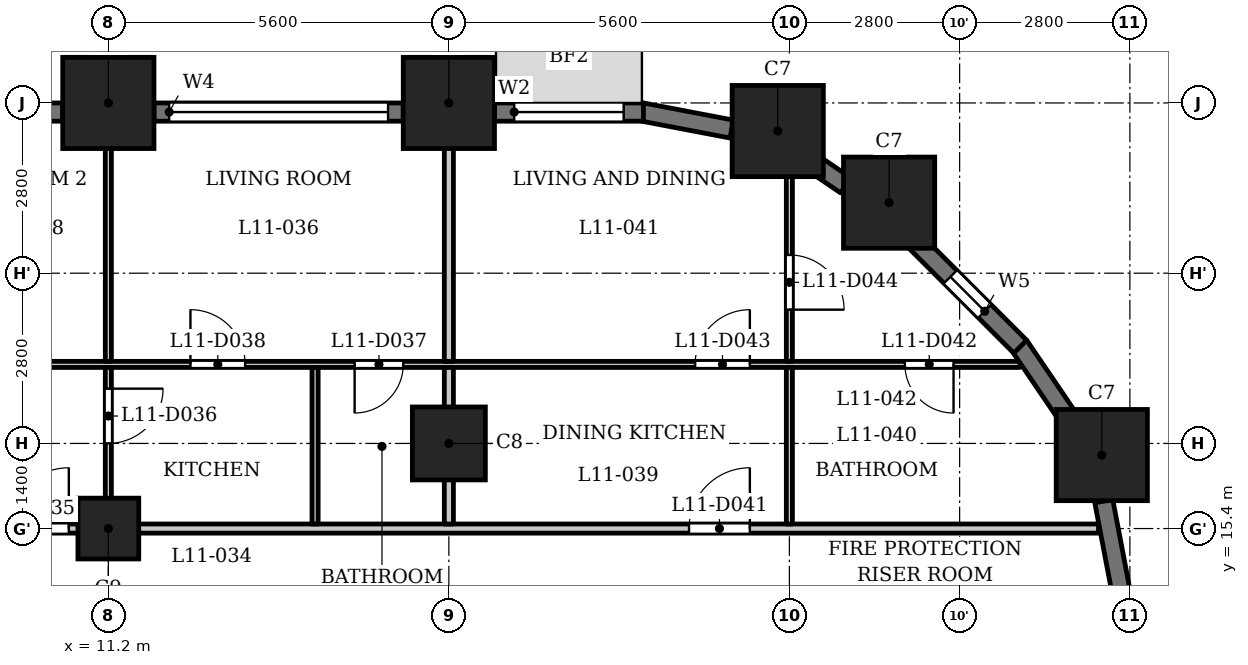
"""IFC4 building model, lengths in metres.
Left out: names, types, materials, properties, quantities, classifications, styles, units other than length and angle.
Written with IfcOpenShell. Run it as: python <this file> out.ifc"""

import sys

from ifc_helpers import new_model, si_unit, direction, frame, frame_2d, origin, origin_2d, place, context, subcontext, project, spatial, rectangle, extrude, element, fill, save


model = new_model("IFC4")
c1 = context("Model", 3, precision=1e-05, world=origin(), true_north=direction((0.0, 1.0)))
c2 = subcontext(c1, "Body", "Model", "MODEL_VIEW")
j1 = project(units=[si_unit("LENGTHUNIT", "METRE"), si_unit("PLANEANGLEUNIT", "RADIAN")], contexts=[c1])
p1 = place(None, origin())
s1 = spatial("IfcSite", under=j1, at=p1, CompositionType="ELEMENT")
p2 = place(p1, origin())
s2 = spatial("IfcBuilding", under=s1, at=p2, CompositionType="ELEMENT")
p3 = place(p2, frame((0.0, 0.0, 48.0)))
s3 = spatial("IfcBuildingStorey", under=s2, at=p3, CompositionType="ELEMENT", Elevation=48.0)
for number, where, z_axis, x_axis in (
    (1, (27.538, 16.609, 0.0), (0.0, 0.0, 1.0), (1.0, 0.0, 0.0)),
    (2, (24.04, 20.76, 0.0), (0.0, 0.0, 1.0), (1.0, 0.0, 0.0)),
    (3, (22.209, 21.938, 0.0), (0.0, 0.0, 1.0), (1.0, 0.0, 0.0)),
    (4, (16.8, 22.4, 0.0), (0.0, 0.0, 1.0), (1.0, 0.0, 0.0)),
    (5, (11.2, 22.4, 0.0), (0.0, 0.0, 1.0), (1.0, 0.0, 0.0)),
):
    element("IfcColumn", number, at=place(p3, frame(where, z_axis=z_axis, x_axis=x_axis)), inside=s3, PredefinedType="COLUMN", context=c2, shape_type="SweptSolid", body=[
        extrude(rectangle(XDim=1.5, YDim=1.5, at=origin_2d()), origin(), (0.0, 0.0, 1.0), 3.5),
    ])
p4 = place(p3, frame((16.8, 16.8, 0.0), z_axis=(0.0, 0.0, 1.0), x_axis=(1.0, 0.0, 0.0)))
e6 = element("IfcColumn", 6, at=p4, inside=s3, PredefinedType="COLUMN", context=c2, shape_type="SweptSolid", body=[
    extrude(rectangle(XDim=1.2, YDim=1.2, at=origin_2d()), origin(), (0.0, 0.0, 1.0), 3.5),
])
p5 = place(p3, frame((11.2, 15.4, 0.0), z_axis=(0.0, 0.0, 1.0), x_axis=(1.0, 0.0, 0.0)))
e7 = element("IfcColumn", 7, at=p5, inside=s3, PredefinedType="COLUMN", context=c2, shape_type="SweptSolid", body=[
    extrude(rectangle(XDim=1.0, YDim=1.0, at=origin_2d()), origin(), (0.0, 0.0, 1.0), 3.5),
])
for number, where, z_axis, x_axis in (
    (8, (27.853, 14.372, 0.0), (0.0, 0.0, 1.0), (-0.187, 0.982, 0.0)),
    (9, (27.025, 17.167, 0.0), (0.0, 0.0, 1.0), (-0.562, 0.827, 0.0)),
):
    element("IfcWall", number, at=place(p3, frame(where, z_axis=z_axis, x_axis=x_axis)), inside=s3, PredefinedType="SOLIDWALL", context=c2, shape_type="SweptSolid", body=[
        extrude(rectangle(XDim=1.506, YDim=0.3, at=frame_2d((0.753, 0.0))), origin(), (0.0, 0.0, 1.0), 2.35),
    ])
p6 = place(p3, frame((26.197, 18.391, 0.0), z_axis=(0.0, 0.0, 1.0), x_axis=(-0.707106781187, 0.707106781187, 0.0)))
e10 = element("IfcWall", 10, at=p6, inside=s3, PredefinedType="SOLIDWALL", context=c2, shape_type="SweptSolid", body=[
    extrude(rectangle(XDim=2.45, YDim=0.3, at=frame_2d((1.225, 0.0))), origin(), (0.0, 0.0, 1.0), 2.35),
])
p7 = place(p6, frame((0.825, 0.0, 0.6)))
e11 = element("IfcOpeningElement", 11, at=p7, cuts=e10, PredefinedType="OPENING", context=c2, shape_type="SweptSolid", body=[
    extrude(rectangle(XDim=0.8, YDim=1.55, at=frame_2d((0.4, 0.775))), frame((0.0, 0.16, 0.0), z_axis=(0.0, -1.0, 0.0), x_axis=(1.0, 0.0, 0.0)), (0.0, 0.0, 1.0), 0.32),
])
p8 = place(p3, frame((23.327, 21.045, 0.0), z_axis=(0.0, 0.0, 1.0), x_axis=(-0.827080706709, 0.562083182981, 0.0)))
e12 = element("IfcWall", 12, at=p8, inside=s3, PredefinedType="SOLIDWALL", context=c2, shape_type="SweptSolid", body=[
    extrude(rectangle(XDim=0.677, YDim=0.3, at=frame_2d((0.339, 0.0))), origin(), (0.0, 0.0, 1.0), 3.2),
])
p9 = place(p3, frame((21.451, 21.97, 0.0), z_axis=(0.0, 0.0, 1.0), x_axis=(-0.982287454367, 0.187380247071, 0.0)))
e13 = element("IfcWall", 13, at=p9, inside=s3, PredefinedType="SOLIDWALL", context=c2, shape_type="SweptSolid", body=[
    extrude(rectangle(XDim=1.506, YDim=0.3, at=frame_2d((0.753, 0.0))), origin(), (0.0, 0.0, 1.0), 2.35),
])
p10 = place(p3, frame((20.0, 22.25, 0.0), z_axis=(0.0, 0.0, 1.0), x_axis=(-1.0, 0.0, 0.0)))
e14 = element("IfcWall", 14, at=p10, inside=s3, PredefinedType="SOLIDWALL", context=c2, shape_type="SweptSolid", body=[
    extrude(rectangle(XDim=2.45, YDim=0.3, at=frame_2d((1.225, 0.0))), origin(), (0.0, 0.0, 1.0), 2.35),
])
p11 = place(p10, frame((0.325, 0.0, 0.9)))
e15 = element("IfcOpeningElement", 15, at=p11, cuts=e14, PredefinedType="OPENING", context=c2, shape_type="SweptSolid", body=[
    extrude(rectangle(XDim=1.8, YDim=1.25, at=frame_2d((0.9, 0.625))), frame((0.0, 0.16, 0.0), z_axis=(0.0, -1.0, 0.0), x_axis=(1.0, 0.0, 0.0)), (0.0, 0.0, 1.0), 0.32),
])
p12 = place(p3, frame((16.05, 22.25, 0.0), z_axis=(0.0, 0.0, 1.0), x_axis=(-1.0, 0.0, 0.0)))
e16 = element("IfcWall", 16, at=p12, inside=s3, PredefinedType="SOLIDWALL", context=c2, shape_type="SweptSolid", body=[
    extrude(rectangle(XDim=4.1, YDim=0.3, at=frame_2d((2.05, 0.0))), origin(), (0.0, 0.0, 1.0), 2.35),
])
p13 = place(p12, frame((0.25, 0.0, 1.2)))
e17 = element("IfcOpeningElement", 17, at=p13, cuts=e16, PredefinedType="OPENING", context=c2, shape_type="SweptSolid", body=[
    extrude(rectangle(XDim=3.6, YDim=0.95, at=frame_2d((1.8, 0.475))), frame((0.0, 0.16, 0.0), z_axis=(0.0, -1.0, 0.0), x_axis=(1.0, 0.0, 0.0)), (0.0, 0.0, 1.0), 0.32),
])
p14 = place(p3, frame((10.45, 22.25, 0.0), z_axis=(0.0, 0.0, 1.0), x_axis=(-1.0, 0.0, 0.0)))
e18 = element("IfcWall", 18, at=p14, inside=s3, PredefinedType="SOLIDWALL", context=c2, shape_type="SweptSolid", body=[
    extrude(rectangle(XDim=4.1, YDim=0.3, at=frame_2d((2.05, 0.0))), origin(), (0.0, 0.0, 1.0), 2.35),
])
p15 = place(p14, frame((0.387, 0.0, 0.6)))
e19 = element("IfcOpeningElement", 19, at=p15, cuts=e18, PredefinedType="OPENING", context=c2, shape_type="SweptSolid", body=[
    extrude(rectangle(XDim=1.2, YDim=1.55, at=frame_2d((0.6, 0.775))), frame((0.0, 0.16, 0.0), z_axis=(0.0, -1.0, 0.0), x_axis=(1.0, 0.0, 0.0)), (0.0, 0.0, 1.0), 0.32),
])
p16 = place(p14, frame((2.512, 0.0, 0.6)))
e20 = element("IfcOpeningElement", 20, at=p16, cuts=e18, PredefinedType="OPENING", context=c2, shape_type="SweptSolid", body=[
    extrude(rectangle(XDim=1.2, YDim=1.55, at=frame_2d((0.6, 0.775))), frame((0.0, 0.16, 0.0), z_axis=(0.0, -1.0, 0.0), x_axis=(1.0, 0.0, 0.0)), (0.0, 0.0, 1.0), 0.32),
])
p17 = place(p3, frame((-27.484, 15.4, 0.0), z_axis=(0.0, 0.0, 1.0), x_axis=(1.0, 0.0, 0.0)))
e21 = element("IfcWall", 21, at=p17, inside=s3, PredefinedType="PARTITIONING", context=c2, shape_type="SweptSolid", body=[
    extrude(rectangle(XDim=54.968, YDim=0.15, at=frame_2d((27.484, 0.0))), origin(), (0.0, 0.0, 1.0), 3.2),
])
p18 = place(p17, frame((8.784, 0.0, 0.0)))
e22 = element("IfcOpeningElement", 22, at=p18, cuts=e21, PredefinedType="OPENING", context=c2, shape_type="SweptSolid", body=[
    extrude(rectangle(XDim=1.0, YDim=2.1, at=frame_2d((0.5, 1.05))), frame((0.0, 0.085, 0.0), z_axis=(0.0, -1.0, 0.0), x_axis=(1.0, 0.0, 0.0)), (0.0, 0.0, 1.0), 0.17),
])
p19 = place(p17, frame((14.634, 0.0, 0.0)))
e23 = element("IfcOpeningElement", 23, at=p19, cuts=e21, PredefinedType="OPENING", context=c2, shape_type="SweptSolid", body=[
    extrude(rectangle(XDim=1.0, YDim=2.1, at=frame_2d((0.5, 1.05))), frame((0.0, 0.085, 0.0), z_axis=(0.0, -1.0, 0.0), x_axis=(1.0, 0.0, 0.0)), (0.0, 0.0, 1.0), 0.17),
])
p20 = place(p17, frame((25.834, 0.0, 0.0)))
e24 = element("IfcOpeningElement", 24, at=p20, cuts=e21, PredefinedType="OPENING", context=c2, shape_type="SweptSolid", body=[
    extrude(rectangle(XDim=1.0, YDim=2.1, at=frame_2d((0.5, 1.05))), frame((0.0, 0.085, 0.0), z_axis=(0.0, -1.0, 0.0), x_axis=(1.0, 0.0, 0.0)), (0.0, 0.0, 1.0), 0.17),
])
p21 = place(p17, frame((30.184, 0.0, 0.0)))
e25 = element("IfcOpeningElement", 25, at=p21, cuts=e21, PredefinedType="OPENING", context=c2, shape_type="SweptSolid", body=[
    extrude(rectangle(XDim=1.0, YDim=2.1, at=frame_2d((0.5, 1.05))), frame((0.0, 0.085, 0.0), z_axis=(0.0, -1.0, 0.0), x_axis=(1.0, 0.0, 0.0)), (0.0, 0.0, 1.0), 0.17),
])
p22 = place(p17, frame((37.034, 0.0, 0.0)))
e26 = element("IfcOpeningElement", 26, at=p22, cuts=e21, PredefinedType="OPENING", context=c2, shape_type="SweptSolid", body=[
    extrude(rectangle(XDim=1.0, YDim=2.1, at=frame_2d((0.5, 1.05))), frame((0.0, 0.085, 0.0), z_axis=(0.0, -1.0, 0.0), x_axis=(1.0, 0.0, 0.0)), (0.0, 0.0, 1.0), 0.17),
])
p23 = place(p17, frame((48.234, 0.0, 0.0)))
e27 = element("IfcOpeningElement", 27, at=p23, cuts=e21, PredefinedType="OPENING", context=c2, shape_type="SweptSolid", body=[
    extrude(rectangle(XDim=1.0, YDim=2.1, at=frame_2d((0.5, 1.05))), frame((0.0, 0.085, 0.0), z_axis=(0.0, -1.0, 0.0), x_axis=(1.0, 0.0, 0.0)), (0.0, 0.0, 1.0), 0.17),
])
p24 = place(p3, frame((-26.44, 18.1, 0.0), z_axis=(0.0, 0.0, 1.0), x_axis=(1.0, 0.0, 0.0)))
e28 = element("IfcWall", 28, at=p24, inside=s3, PredefinedType="PARTITIONING", context=c2, shape_type="SweptSolid", body=[
    extrude(rectangle(XDim=52.63, YDim=0.1, at=frame_2d((26.315, 0.0))), origin(), (0.0, 0.0, 1.0), 3.2),
])
p25 = place(p24, frame((2.626, 0.0, 0.0)))
e29 = element("IfcOpeningElement", 29, at=p25, cuts=e28, PredefinedType="OPENING", context=c2, shape_type="SweptSolid", body=[
    extrude(rectangle(XDim=0.8, YDim=2.1, at=frame_2d((0.4, 1.05))), frame((0.0, 0.06, 0.0), z_axis=(0.0, -1.0, 0.0), x_axis=(1.0, 0.0, 0.0)), (0.0, 0.0, 1.0), 0.12),
])
p26 = place(p24, frame((7.84, 0.0, 0.0)))
e30 = element("IfcOpeningElement", 30, at=p26, cuts=e28, PredefinedType="OPENING", context=c2, shape_type="SweptSolid", body=[
    extrude(rectangle(XDim=0.9, YDim=2.1, at=frame_2d((0.45, 1.05))), frame((0.0, 0.06, 0.0), z_axis=(0.0, -1.0, 0.0), x_axis=(1.0, 0.0, 0.0)), (0.0, 0.0, 1.0), 0.12),
])
p27 = place(p24, frame((18.49, 0.0, 0.0)))
e31 = element("IfcOpeningElement", 31, at=p27, cuts=e28, PredefinedType="OPENING", context=c2, shape_type="SweptSolid", body=[
    extrude(rectangle(XDim=0.8, YDim=2.1, at=frame_2d((0.4, 1.05))), frame((0.0, 0.06, 0.0), z_axis=(0.0, -1.0, 0.0), x_axis=(1.0, 0.0, 0.0)), (0.0, 0.0, 1.0), 0.12),
])
p28 = place(p24, frame((16.54, 0.0, 0.0)))
e32 = element("IfcOpeningElement", 32, at=p28, cuts=e28, PredefinedType="OPENING", context=c2, shape_type="SweptSolid", body=[
    extrude(rectangle(XDim=0.9, YDim=2.1, at=frame_2d((0.45, 1.05))), frame((0.0, 0.06, 0.0), z_axis=(0.0, -1.0, 0.0), x_axis=(1.0, 0.0, 0.0)), (0.0, 0.0, 1.0), 0.12),
])
p29 = place(p24, frame((10.89, 0.0, 0.0)))
e33 = element("IfcOpeningElement", 33, at=p29, cuts=e28, PredefinedType="OPENING", context=c2, shape_type="SweptSolid", body=[
    extrude(rectangle(XDim=0.9, YDim=2.1, at=frame_2d((0.45, 1.05))), frame((0.0, 0.06, 0.0), z_axis=(0.0, -1.0, 0.0), x_axis=(1.0, 0.0, 0.0)), (0.0, 0.0, 1.0), 0.12),
])
p30 = place(p24, frame((12.94, 0.0, 0.0)))
e34 = element("IfcOpeningElement", 34, at=p30, cuts=e28, PredefinedType="OPENING", context=c2, shape_type="SweptSolid", body=[
    extrude(rectangle(XDim=0.9, YDim=2.1, at=frame_2d((0.45, 1.05))), frame((0.0, 0.06, 0.0), z_axis=(0.0, -1.0, 0.0), x_axis=(1.0, 0.0, 0.0)), (0.0, 0.0, 1.0), 0.12),
])
p31 = place(p24, frame((21.49, 0.0, 0.0)))
e35 = element("IfcOpeningElement", 35, at=p31, cuts=e28, PredefinedType="OPENING", context=c2, shape_type="SweptSolid", body=[
    extrude(rectangle(XDim=0.8, YDim=2.1, at=frame_2d((0.4, 1.05))), frame((0.0, 0.06, 0.0), z_axis=(0.0, -1.0, 0.0), x_axis=(1.0, 0.0, 0.0)), (0.0, 0.0, 1.0), 0.12),
])
p32 = place(p24, frame((24.89, 0.0, 0.0)))
e36 = element("IfcOpeningElement", 36, at=p32, cuts=e28, PredefinedType="OPENING", context=c2, shape_type="SweptSolid", body=[
    extrude(rectangle(XDim=0.9, YDim=2.1, at=frame_2d((0.45, 1.05))), frame((0.0, 0.06, 0.0), z_axis=(0.0, -1.0, 0.0), x_axis=(1.0, 0.0, 0.0)), (0.0, 0.0, 1.0), 0.12),
])
p33 = place(p24, frame((27.09, 0.0, 0.0)))
e37 = element("IfcOpeningElement", 37, at=p33, cuts=e28, PredefinedType="OPENING", context=c2, shape_type="SweptSolid", body=[
    extrude(rectangle(XDim=0.8, YDim=2.1, at=frame_2d((0.4, 1.05))), frame((0.0, 0.06, 0.0), z_axis=(0.0, -1.0, 0.0), x_axis=(1.0, 0.0, 0.0)), (0.0, 0.0, 1.0), 0.12),
])
p34 = place(p24, frame((28.99, 0.0, 0.0)))
e38 = element("IfcOpeningElement", 38, at=p34, cuts=e28, PredefinedType="OPENING", context=c2, shape_type="SweptSolid", body=[
    extrude(rectangle(XDim=0.9, YDim=2.1, at=frame_2d((0.45, 1.05))), frame((0.0, 0.06, 0.0), z_axis=(0.0, -1.0, 0.0), x_axis=(1.0, 0.0, 0.0)), (0.0, 0.0, 1.0), 0.12),
])
p35 = place(p24, frame((41.69, 0.0, 0.0)))
e39 = element("IfcOpeningElement", 39, at=p35, cuts=e28, PredefinedType="OPENING", context=c2, shape_type="SweptSolid", body=[
    extrude(rectangle(XDim=0.8, YDim=2.1, at=frame_2d((0.4, 1.05))), frame((0.0, 0.06, 0.0), z_axis=(0.0, -1.0, 0.0), x_axis=(1.0, 0.0, 0.0)), (0.0, 0.0, 1.0), 0.12),
])
p36 = place(p24, frame((38.99, 0.0, 0.0)))
e40 = element("IfcOpeningElement", 40, at=p36, cuts=e28, PredefinedType="OPENING", context=c2, shape_type="SweptSolid", body=[
    extrude(rectangle(XDim=0.9, YDim=2.1, at=frame_2d((0.45, 1.05))), frame((0.0, 0.06, 0.0), z_axis=(0.0, -1.0, 0.0), x_axis=(1.0, 0.0, 0.0)), (0.0, 0.0, 1.0), 0.12),
])
p37 = place(p24, frame((33.29, 0.0, 0.0)))
e41 = element("IfcOpeningElement", 41, at=p37, cuts=e28, PredefinedType="OPENING", context=c2, shape_type="SweptSolid", body=[
    extrude(rectangle(XDim=0.9, YDim=2.1, at=frame_2d((0.45, 1.05))), frame((0.0, 0.06, 0.0), z_axis=(0.0, -1.0, 0.0), x_axis=(1.0, 0.0, 0.0)), (0.0, 0.0, 1.0), 0.12),
])
p38 = place(p24, frame((35.34, 0.0, 0.0)))
e42 = element("IfcOpeningElement", 42, at=p38, cuts=e28, PredefinedType="OPENING", context=c2, shape_type="SweptSolid", body=[
    extrude(rectangle(XDim=0.9, YDim=2.1, at=frame_2d((0.45, 1.05))), frame((0.0, 0.06, 0.0), z_axis=(0.0, -1.0, 0.0), x_axis=(1.0, 0.0, 0.0)), (0.0, 0.0, 1.0), 0.12),
])
p39 = place(p24, frame((50.74, 0.0, 0.0)))
e43 = element("IfcOpeningElement", 43, at=p39, cuts=e28, PredefinedType="OPENING", context=c2, shape_type="SweptSolid", body=[
    extrude(rectangle(XDim=0.8, YDim=2.1, at=frame_2d((0.4, 1.05))), frame((0.0, 0.06, 0.0), z_axis=(0.0, -1.0, 0.0), x_axis=(1.0, 0.0, 0.0)), (0.0, 0.0, 1.0), 0.12),
])
p40 = place(p24, frame((47.29, 0.0, 0.0)))
e44 = element("IfcOpeningElement", 44, at=p40, cuts=e28, PredefinedType="OPENING", context=c2, shape_type="SweptSolid", body=[
    extrude(rectangle(XDim=0.9, YDim=2.1, at=frame_2d((0.45, 1.05))), frame((0.0, 0.06, 0.0), z_axis=(0.0, -1.0, 0.0), x_axis=(1.0, 0.0, 0.0)), (0.0, 0.0, 1.0), 0.12),
])
p41 = place(p3, frame((11.2, 15.475, 0.0), z_axis=(0.0, 0.0, 1.0), x_axis=(0.0, 1.0, 0.0)))
e45 = element("IfcWall", 45, at=p41, inside=s3, PredefinedType="PARTITIONING", context=c2, shape_type="SweptSolid", body=[
    extrude(rectangle(XDim=2.575, YDim=0.1, at=frame_2d((1.288, 0.0))), origin(), (0.0, 0.0, 1.0), 3.2),
])
p42 = place(p41, frame((1.326, 0.0, 0.0)))
e46 = element("IfcOpeningElement", 46, at=p42, cuts=e45, PredefinedType="OPENING", context=c2, shape_type="SweptSolid", body=[
    extrude(rectangle(XDim=0.9, YDim=2.1, at=frame_2d((0.45, 1.05))), frame((0.0, 0.06, 0.0), z_axis=(0.0, -1.0, 0.0), x_axis=(1.0, 0.0, 0.0)), (0.0, 0.0, 1.0), 0.12),
])
p43 = place(p3, frame((11.2, 18.15, 0.0), z_axis=(0.0, 0.0, 1.0), x_axis=(0.0, 1.0, 0.0)))
e47 = element("IfcWall", 47, at=p43, inside=s3, PredefinedType="PARTITIONING", context=c2, shape_type="SweptSolid", body=[
    extrude(rectangle(XDim=4.98, YDim=0.1, at=frame_2d((2.49, 0.0))), origin(), (0.0, 0.0, 1.0), 3.2),
])
p44 = place(p3, frame((14.6, 15.475, 0.0), z_axis=(0.0, 0.0, 1.0), x_axis=(0.0, 1.0, 0.0)))
e48 = element("IfcWall", 48, at=p44, inside=s3, PredefinedType="PARTITIONING", context=c2, shape_type="SweptSolid", body=[
    extrude(rectangle(XDim=2.575, YDim=0.1, at=frame_2d((1.288, 0.0))), origin(), (0.0, 0.0, 1.0), 3.2),
])
p45 = place(p3, frame((16.8, 15.475, 0.0), z_axis=(0.0, 0.0, 1.0), x_axis=(0.0, 1.0, 0.0)))
e49 = element("IfcWall", 49, at=p45, inside=s3, PredefinedType="PARTITIONING", context=c2, shape_type="SweptSolid", body=[
    extrude(rectangle(XDim=2.575, YDim=0.15, at=frame_2d((1.288, 0.0))), origin(), (0.0, 0.0, 1.0), 3.2),
])
p46 = place(p3, frame((16.8, 18.15, 0.0), z_axis=(0.0, 0.0, 1.0), x_axis=(0.0, 1.0, 0.0)))
e50 = element("IfcWall", 50, at=p46, inside=s3, PredefinedType="PARTITIONING", context=c2, shape_type="SweptSolid", body=[
    extrude(rectangle(XDim=4.98, YDim=0.15, at=frame_2d((2.49, 0.0))), origin(), (0.0, 0.0, 1.0), 3.2),
])
p47 = place(p3, frame((22.4, 15.475, 0.0), z_axis=(0.0, 0.0, 1.0), x_axis=(0.0, 1.0, 0.0)))
e51 = element("IfcWall", 51, at=p47, inside=s3, PredefinedType="PARTITIONING", context=c2, shape_type="SweptSolid", body=[
    extrude(rectangle(XDim=2.575, YDim=0.1, at=frame_2d((1.288, 0.0))), origin(), (0.0, 0.0, 1.0), 3.2),
])
p48 = place(p3, frame((22.4, 18.15, 0.0), z_axis=(0.0, 0.0, 1.0), x_axis=(0.0, 1.0, 0.0)))
e52 = element("IfcWall", 52, at=p48, inside=s3, PredefinedType="PARTITIONING", context=c2, shape_type="SweptSolid", body=[
    extrude(rectangle(XDim=3.57, YDim=0.1, at=frame_2d((1.785, 0.0))), origin(), (0.0, 0.0, 1.0), 3.2),
])
p49 = place(p48, frame((0.85, 0.0, 0.0)))
e53 = element("IfcOpeningElement", 53, at=p49, cuts=e52, PredefinedType="OPENING", context=c2, shape_type="SweptSolid", body=[
    extrude(rectangle(XDim=0.9, YDim=2.1, at=frame_2d((0.45, 1.05))), frame((0.0, 0.06, 0.0), z_axis=(0.0, -1.0, 0.0), x_axis=(1.0, 0.0, 0.0)), (0.0, 0.0, 1.0), 0.12),
])
p50 = place(p22, origin())
e54 = element("IfcDoor", 54, at=p50, inside=s3, OperationType="SINGLE_SWING_LEFT", PredefinedType="DOOR", context=c2, shape_type="SweptSolid", body=[
    extrude(rectangle(XDim=1.0, YDim=2.1, at=frame_2d((0.5, 1.05))), frame((0.0, 0.025, 0.0), z_axis=(0.0, -1.0, 0.0), x_axis=(1.0, 0.0, 0.0)), (0.0, 0.0, 1.0), 0.05),
])
fill(e26, e54)
p51 = place(p42, origin())
e55 = element("IfcDoor", 55, at=p51, inside=s3, OperationType="SINGLE_SWING_RIGHT", PredefinedType="DOOR", context=c2, shape_type="SweptSolid", body=[
    extrude(rectangle(XDim=0.9, YDim=2.1, at=frame_2d((0.45, 1.05))), frame((0.0, 0.025, 0.0), z_axis=(0.0, -1.0, 0.0), x_axis=(1.0, 0.0, 0.0)), (0.0, 0.0, 1.0), 0.05),
])
fill(e46, e55)
p52 = place(p35, origin())
e56 = element("IfcDoor", 56, at=p52, inside=s3, OperationType="SINGLE_SWING_LEFT", PredefinedType="DOOR", context=c2, shape_type="SweptSolid", body=[
    extrude(rectangle(XDim=0.8, YDim=2.1, at=frame_2d((0.4, 1.05))), frame((0.0, 0.025, 0.0), z_axis=(0.0, -1.0, 0.0), x_axis=(1.0, 0.0, 0.0)), (0.0, 0.0, 1.0), 0.05),
])
fill(e39, e56)
p53 = place(p36, origin())
e57 = element("IfcDoor", 57, at=p53, inside=s3, OperationType="SINGLE_SWING_RIGHT", PredefinedType="DOOR", context=c2, shape_type="SweptSolid", body=[
    extrude(rectangle(XDim=0.9, YDim=2.1, at=frame_2d((0.45, 1.05))), frame((0.0, 0.025, 0.0), z_axis=(0.0, -1.0, 0.0), x_axis=(1.0, 0.0, 0.0)), (0.0, 0.0, 1.0), 0.05),
])
fill(e40, e57)
p54 = place(p23, origin())
e58 = element("IfcDoor", 58, at=p54, inside=s3, OperationType="SINGLE_SWING_LEFT", PredefinedType="DOOR", context=c2, shape_type="SweptSolid", body=[
    extrude(rectangle(XDim=1.0, YDim=2.1, at=frame_2d((0.5, 1.05))), frame((0.0, 0.025, 0.0), z_axis=(0.0, -1.0, 0.0), x_axis=(1.0, 0.0, 0.0)), (0.0, 0.0, 1.0), 0.05),
])
fill(e27, e58)
p55 = place(p39, origin())
e59 = element("IfcDoor", 59, at=p55, inside=s3, OperationType="SINGLE_SWING_RIGHT", PredefinedType="DOOR", context=c2, shape_type="SweptSolid", body=[
    extrude(rectangle(XDim=0.8, YDim=2.1, at=frame_2d((0.4, 1.05))), frame((0.0, 0.025, 0.0), z_axis=(0.0, -1.0, 0.0), x_axis=(1.0, 0.0, 0.0)), (0.0, 0.0, 1.0), 0.05),
])
fill(e43, e59)
p56 = place(p40, origin())
e60 = element("IfcDoor", 60, at=p56, inside=s3, OperationType="SINGLE_SWING_LEFT", PredefinedType="DOOR", context=c2, shape_type="SweptSolid", body=[
    extrude(rectangle(XDim=0.9, YDim=2.1, at=frame_2d((0.45, 1.05))), frame((0.0, 0.025, 0.0), z_axis=(0.0, -1.0, 0.0), x_axis=(1.0, 0.0, 0.0)), (0.0, 0.0, 1.0), 0.05),
])
fill(e44, e60)
p57 = place(p49, origin())
e61 = element("IfcDoor", 61, at=p57, inside=s3, OperationType="SINGLE_SWING_LEFT", PredefinedType="DOOR", context=c2, shape_type="SweptSolid", body=[
    extrude(rectangle(XDim=0.9, YDim=2.1, at=frame_2d((0.45, 1.05))), frame((0.0, 0.025, 0.0), z_axis=(0.0, -1.0, 0.0), x_axis=(1.0, 0.0, 0.0)), (0.0, 0.0, 1.0), 0.05),
])
fill(e53, e61)
p58 = place(p7, origin())
e62 = element("IfcWindow", 62, at=p58, inside=s3, PartitioningType="SINGLE_PANEL", PredefinedType="WINDOW", context=c2, shape_type="SweptSolid", body=[
    extrude(rectangle(XDim=0.8, YDim=1.55, at=frame_2d((0.4, 0.775))), frame((0.0, 0.03, 0.0), z_axis=(0.0, -1.0, 0.0), x_axis=(1.0, 0.0, 0.0)), (0.0, 0.0, 1.0), 0.06),
])
fill(e11, e62)
p59 = place(p11, origin())
e63 = element("IfcWindow", 63, at=p59, inside=s3, PartitioningType="SINGLE_PANEL", PredefinedType="WINDOW", context=c2, shape_type="SweptSolid", body=[
    extrude(rectangle(XDim=1.8, YDim=1.25, at=frame_2d((0.9, 0.625))), frame((0.0, 0.03, 0.0), z_axis=(0.0, -1.0, 0.0), x_axis=(1.0, 0.0, 0.0)), (0.0, 0.0, 1.0), 0.06),
])
fill(e15, e63)
p60 = place(p13, origin())
e64 = element("IfcWindow", 64, at=p60, inside=s3, PartitioningType="SINGLE_PANEL", PredefinedType="WINDOW", context=c2, shape_type="SweptSolid", body=[
    extrude(rectangle(XDim=3.6, YDim=0.95, at=frame_2d((1.8, 0.475))), frame((0.0, 0.03, 0.0), z_axis=(0.0, -1.0, 0.0), x_axis=(1.0, 0.0, 0.0)), (0.0, 0.0, 1.0), 0.06),
])
fill(e17, e64)
save(model, sys.argv[1])
